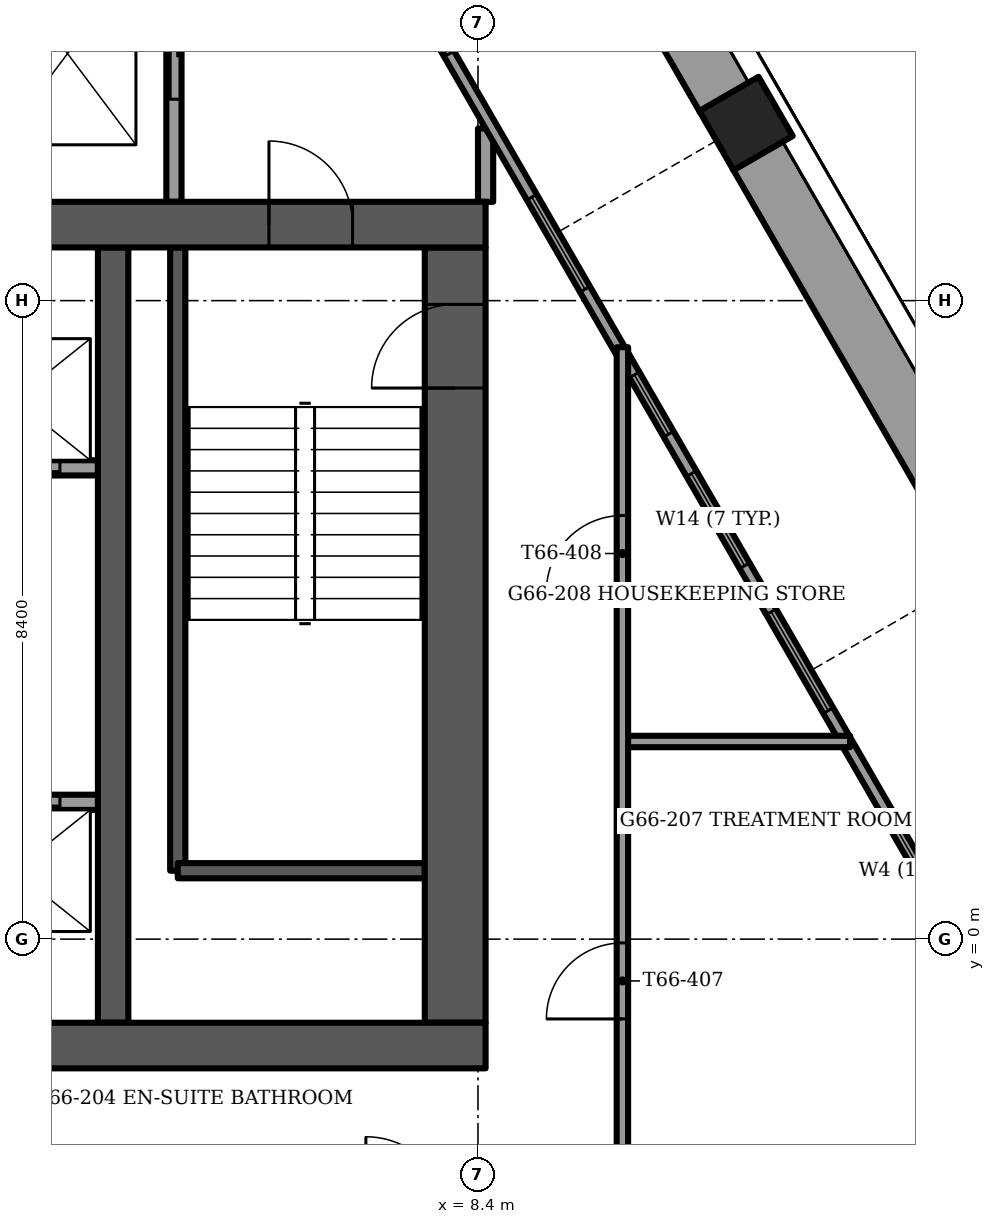
"""IFC4 building model, lengths in metres.
Left out: names, types, materials, properties, quantities, classifications, styles, units other than length and angle.
Written with IfcOpenShell. Run it as: python <this file> out.ifc"""

import sys

from ifc_helpers import new_model, si_unit, direction, frame, frame_2d, origin, origin_2d, place, context, subcontext, project, spatial, rectangle, extrude, element, fill, save


model = new_model("IFC4")
c1 = context("Model", 3, precision=1e-05, world=origin(), true_north=direction((0.0, 1.0)))
c2 = subcontext(c1, "Body", "Model", "MODEL_VIEW")
j1 = project(units=[si_unit("LENGTHUNIT", "METRE"), si_unit("PLANEANGLEUNIT", "RADIAN")], contexts=[c1])
p1 = place(None, origin())
s1 = spatial("IfcSite", under=j1, at=p1, CompositionType="ELEMENT")
p2 = place(p1, origin())
s2 = spatial("IfcBuilding", under=s1, at=p2, CompositionType="ELEMENT")
p3 = place(p2, frame((0.0, 0.0, 267.5)))
s3 = spatial("IfcBuildingStorey", under=s2, at=p3, CompositionType="ELEMENT", Elevation=267.5)
p4 = place(p3, frame((11.926, 10.73, -1.2), z_axis=(0.0, 0.0, 1.0), x_axis=(0.5, -0.866025403784, 0.0)))
e1 = element("IfcColumn", 1, at=p4, inside=s3, PredefinedType="COLUMN", context=c2, shape_type="SweptSolid", body=[
    extrude(rectangle(XDim=0.9, YDim=0.9, at=origin_2d()), origin(), (0.0, 0.0, 1.0), 3.75),
])
p5 = place(p3, frame((-8.5, -1.4, -0.3), z_axis=(0.0, 0.0, 1.0), x_axis=(1.0, 0.0, 0.0)))
e2 = element("IfcWall", 2, at=p5, inside=s3, PredefinedType="SHEAR", context=c2, shape_type="SweptSolid", body=[
    extrude(rectangle(XDim=17.0, YDim=0.6, at=frame_2d((8.5, 0.0))), origin(), (0.0, 0.0, 1.0), 3.75),
])
p6 = place(p5, frame((7.7, 0.0, 0.0)))
e3 = element("IfcOpeningElement", 3, at=p6, cuts=e2, PredefinedType="OPENING", context=c2, shape_type="SweptSolid", body=[
    extrude(rectangle(XDim=1.6, YDim=2.1, at=frame_2d((0.8, 1.05))), frame((0.0, 0.3, 0.0), z_axis=(0.0, -1.0, 0.0), x_axis=(1.0, 0.0, 0.0)), (0.0, 0.0, 1.0), 0.6),
])
p7 = place(p3, frame((-8.5, 9.4, -0.3), z_axis=(0.0, 0.0, 1.0), x_axis=(1.0, 0.0, 0.0)))
e4 = element("IfcWall", 4, at=p7, inside=s3, PredefinedType="SHEAR", context=c2, shape_type="SweptSolid", body=[
    extrude(rectangle(XDim=17.0, YDim=0.6, at=frame_2d((8.5, 0.0))), origin(), (0.0, 0.0, 1.0), 3.75),
])
p8 = place(p7, frame((7.7, 0.0, 0.0)))
e5 = element("IfcOpeningElement", 5, at=p8, cuts=e4, PredefinedType="OPENING", context=c2, shape_type="SweptSolid", body=[
    extrude(rectangle(XDim=1.6, YDim=2.1, at=frame_2d((0.8, 1.05))), frame((0.0, 0.3, 0.0), z_axis=(0.0, -1.0, 0.0), x_axis=(1.0, 0.0, 0.0)), (0.0, 0.0, 1.0), 0.6),
])
p9 = place(p7, frame((1.75, 0.0, 0.0)))
e6 = element("IfcOpeningElement", 6, at=p9, cuts=e4, PredefinedType="OPENING", context=c2, shape_type="SweptSolid", body=[
    extrude(rectangle(XDim=1.1, YDim=2.1, at=frame_2d((0.55, 1.05))), frame((0.0, 0.3, 0.0), z_axis=(0.0, -1.0, 0.0), x_axis=(1.0, 0.0, 0.0)), (0.0, 0.0, 1.0), 0.6),
])
p10 = place(p7, frame((14.15, 0.0, 0.0)))
e7 = element("IfcOpeningElement", 7, at=p10, cuts=e4, PredefinedType="OPENING", context=c2, shape_type="SweptSolid", body=[
    extrude(rectangle(XDim=1.1, YDim=2.1, at=frame_2d((0.55, 1.05))), frame((0.0, 0.3, 0.0), z_axis=(0.0, -1.0, 0.0), x_axis=(1.0, 0.0, 0.0)), (0.0, 0.0, 1.0), 0.6),
])
p11 = place(p3, frame((8.1, -1.1, -0.3), z_axis=(0.0, 0.0, 1.0), x_axis=(0.0, 1.0, 0.0)))
e8 = element("IfcWall", 8, at=p11, inside=s3, PredefinedType="SHEAR", context=c2, shape_type="SweptSolid", body=[
    extrude(rectangle(XDim=10.2, YDim=0.8, at=frame_2d((5.1, 0.0))), origin(), (0.0, 0.0, 1.0), 3.75),
])
p12 = place(p11, frame((8.35, 0.0, 0.0)))
e9 = element("IfcOpeningElement", 9, at=p12, cuts=e8, PredefinedType="OPENING", context=c2, shape_type="SweptSolid", body=[
    extrude(rectangle(XDim=1.1, YDim=2.1, at=frame_2d((0.55, 1.05))), frame((0.0, 0.4, 0.0), z_axis=(0.0, -1.0, 0.0), x_axis=(1.0, 0.0, 0.0)), (0.0, 0.0, 1.0), 0.8),
])
p13 = place(p3, frame((3.6, -1.1, -0.3), z_axis=(0.0, 0.0, 1.0), x_axis=(0.0, 1.0, 0.0)))
e10 = element("IfcWall", 10, at=p13, inside=s3, PredefinedType="SHEAR", context=c2, shape_type="SweptSolid", body=[
    extrude(rectangle(XDim=10.2, YDim=0.4, at=frame_2d((5.1, 0.0))), origin(), (0.0, 0.0, 1.0), 3.75),
])
p14 = place(p3, frame((15.046, 5.327, 0.0), z_axis=(0.0, 0.0, 1.0), x_axis=(-0.499997265274, 0.866026982673, 0.0)))
e11 = element("IfcWall", 11, at=p14, inside=s3, PredefinedType="PARAPET", context=c2, shape_type="SweptSolid", body=[
    extrude(rectangle(XDim=5.819, YDim=0.9, at=frame_2d((2.909, 0.0))), origin(), (0.0, 0.0, 1.0), 1.1),
])
p15 = place(p3, frame((11.716, 11.094, 0.0), z_axis=(0.0, 0.0, 1.0), x_axis=(-0.499984362083, 0.866034432152, 0.0)))
e12 = element("IfcWall", 12, at=p15, inside=s3, PredefinedType="PARAPET", context=c2, shape_type="SweptSolid", body=[
    extrude(rectangle(XDim=6.159, YDim=0.9, at=frame_2d((3.08, 0.0))), origin(), (0.0, 0.0, 1.0), 1.1),
])
p16 = place(p3, frame((9.015, -12.236, 0.0), z_axis=(0.0, 0.0, 1.0), x_axis=(0.499998361514, 0.866026349763, 0.0)))
e13 = element("IfcWall", 13, at=p16, inside=s3, PredefinedType="SOLIDWALL", context=c2, shape_type="SweptSolid", body=[
    extrude(rectangle(XDim=12.179, YDim=0.15, at=frame_2d((6.089, 0.0))), origin(), (0.0, 0.0, 1.0), 3.45),
])
p17 = place(p16, frame((2.189, 0.0, 0.15)))
e14 = element("IfcOpeningElement", 14, at=p17, cuts=e13, PredefinedType="OPENING", context=c2, shape_type="SweptSolid", body=[
    extrude(rectangle(XDim=1.5, YDim=2.85, at=frame_2d((0.75, 1.425))), frame((0.0, 0.075, 0.0), z_axis=(0.0, -1.0, 0.0), x_axis=(1.0, 0.0, 0.0)), (0.0, 0.0, 1.0), 0.15),
])
p18 = place(p16, frame((4.389, 0.0, 0.0)))
e15 = element("IfcOpeningElement", 15, at=p18, cuts=e13, PredefinedType="OPENING", context=c2, shape_type="SweptSolid", body=[
    extrude(rectangle(XDim=1.4, YDim=2.4, at=frame_2d((0.7, 1.2))), frame((0.0, 0.075, 0.0), z_axis=(0.0, -1.0, 0.0), x_axis=(1.0, 0.0, 0.0)), (0.0, 0.0, 1.0), 0.15),
])
p19 = place(p16, frame((6.389, 0.0, 0.15)))
e16 = element("IfcOpeningElement", 16, at=p19, cuts=e13, PredefinedType="OPENING", context=c2, shape_type="SweptSolid", body=[
    extrude(rectangle(XDim=0.9, YDim=2.85, at=frame_2d((0.45, 1.425))), frame((0.0, 0.075, 0.0), z_axis=(0.0, -1.0, 0.0), x_axis=(1.0, 0.0, 0.0)), (0.0, 0.0, 1.0), 0.15),
])
p20 = place(p16, frame((7.583, 0.0, 0.0)))
e17 = element("IfcOpeningElement", 17, at=p20, cuts=e13, PredefinedType="OPENING", context=c2, shape_type="SweptSolid", body=[
    extrude(rectangle(XDim=1.4, YDim=2.4, at=frame_2d((0.7, 1.2))), frame((0.0, 0.075, 0.0), z_axis=(0.0, -1.0, 0.0), x_axis=(1.0, 0.0, 0.0)), (0.0, 0.0, 1.0), 0.15),
])
p21 = place(p16, frame((10.834, 0.0, 0.15)))
e18 = element("IfcOpeningElement", 18, at=p21, cuts=e13, PredefinedType="OPENING", context=c2, shape_type="SweptSolid", body=[
    extrude(rectangle(XDim=0.9, YDim=2.73, at=frame_2d((0.45, 1.365))), frame((0.0, 0.075, 0.0), z_axis=(0.0, -1.0, 0.0), x_axis=(1.0, 0.0, 0.0)), (0.0, 0.0, 1.0), 0.15),
])
p22 = place(p3, frame((15.104, -0.624, 0.0), z_axis=(0.0, 0.0, 1.0), x_axis=(-0.499998195608, 0.866026445548, 0.0)))
e19 = element("IfcWall", 19, at=p22, inside=s3, PredefinedType="SOLIDWALL", context=c2, shape_type="SweptSolid", body=[
    extrude(rectangle(XDim=18.956, YDim=0.15, at=frame_2d((9.478, 0.0))), origin(), (0.0, 0.0, 1.0), 3.45),
])
p23 = place(p22, frame((4.192, 0.0, 0.15)))
e20 = element("IfcOpeningElement", 20, at=p23, cuts=e19, PredefinedType="OPENING", context=c2, shape_type="SweptSolid", body=[
    extrude(rectangle(XDim=1.5, YDim=2.85, at=frame_2d((0.75, 1.425))), frame((0.0, 0.075, 0.0), z_axis=(0.0, -1.0, 0.0), x_axis=(1.0, 0.0, 0.0)), (0.0, 0.0, 1.0), 0.15),
])
p24 = place(p22, frame((6.392, 0.0, 0.15)))
e21 = element("IfcOpeningElement", 21, at=p24, cuts=e19, PredefinedType="OPENING", context=c2, shape_type="SweptSolid", body=[
    extrude(rectangle(XDim=1.4, YDim=2.85, at=frame_2d((0.7, 1.425))), frame((0.0, 0.075, 0.0), z_axis=(0.0, -1.0, 0.0), x_axis=(1.0, 0.0, 0.0)), (0.0, 0.0, 1.0), 0.15),
])
p25 = place(p22, frame((8.392, 0.0, 0.15)))
e22 = element("IfcOpeningElement", 22, at=p25, cuts=e19, PredefinedType="OPENING", context=c2, shape_type="SweptSolid", body=[
    extrude(rectangle(XDim=0.9, YDim=2.85, at=frame_2d((0.45, 1.425))), frame((0.0, 0.075, 0.0), z_axis=(0.0, -1.0, 0.0), x_axis=(1.0, 0.0, 0.0)), (0.0, 0.0, 1.0), 0.15),
])
p26 = place(p22, frame((10.592, 0.0, 0.15)))
e23 = element("IfcOpeningElement", 23, at=p26, cuts=e19, PredefinedType="OPENING", context=c2, shape_type="SweptSolid", body=[
    extrude(rectangle(XDim=1.4, YDim=2.85, at=frame_2d((0.7, 1.425))), frame((0.0, 0.075, 0.0), z_axis=(0.0, -1.0, 0.0), x_axis=(1.0, 0.0, 0.0)), (0.0, 0.0, 1.0), 0.15),
])
p27 = place(p22, frame((14.168, 0.0, 0.0)))
e24 = element("IfcOpeningElement", 24, at=p27, cuts=e19, PredefinedType="OPENING", context=c2, shape_type="SweptSolid", body=[
    extrude(rectangle(XDim=1.4, YDim=2.4, at=frame_2d((0.7, 1.2))), frame((0.0, 0.075, 0.0), z_axis=(0.0, -1.0, 0.0), x_axis=(1.0, 0.0, 0.0)), (0.0, 0.0, 1.0), 0.15),
])
p28 = place(p22, frame((0.998, 0.0, 0.15)))
e25 = element("IfcOpeningElement", 25, at=p28, cuts=e19, PredefinedType="OPENING", context=c2, shape_type="SweptSolid", body=[
    extrude(rectangle(XDim=1.5, YDim=2.73, at=frame_2d((0.75, 1.365))), frame((0.0, 0.075, 0.0), z_axis=(0.0, -1.0, 0.0), x_axis=(1.0, 0.0, 0.0)), (0.0, 0.0, 1.0), 0.15),
])
p29 = place(p22, frame((17.062, 0.0, 0.15)))
e26 = element("IfcOpeningElement", 26, at=p29, cuts=e19, PredefinedType="OPENING", context=c2, shape_type="SweptSolid", body=[
    extrude(rectangle(XDim=1.5, YDim=2.73, at=frame_2d((0.75, 1.365))), frame((0.0, 0.075, 0.0), z_axis=(0.0, -1.0, 0.0), x_axis=(1.0, 0.0, 0.0)), (0.0, 0.0, 1.0), 0.15),
])
p30 = place(p3, frame((1.1, 1.8, 0.0), z_axis=(0.0, 0.0, 1.0), x_axis=(1.0, 0.0, 0.0)))
e27 = element("IfcWall", 27, at=p30, inside=s3, PredefinedType="PARTITIONING", context=c2, shape_type="SweptSolid", body=[
    extrude(rectangle(XDim=2.3, YDim=0.2, at=frame_2d((1.15, 0.0))), origin(), (0.0, 0.0, 1.0), 3.45),
])
p31 = place(p30, frame((0.6, 0.0, 0.0)))
e28 = element("IfcOpeningElement", 28, at=p31, cuts=e27, PredefinedType="OPENING", context=c2, shape_type="SweptSolid", body=[
    extrude(rectangle(XDim=1.2, YDim=2.1, at=frame_2d((0.6, 1.05))), frame((0.0, 0.1, 0.0), z_axis=(0.0, -1.0, 0.0), x_axis=(1.0, 0.0, 0.0)), (0.0, 0.0, 1.0), 0.2),
])
p32 = place(p3, frame((1.1, 6.2, 0.0), z_axis=(0.0, 0.0, 1.0), x_axis=(1.0, 0.0, 0.0)))
e29 = element("IfcWall", 29, at=p32, inside=s3, PredefinedType="PARTITIONING", context=c2, shape_type="SweptSolid", body=[
    extrude(rectangle(XDim=2.3, YDim=0.2, at=frame_2d((1.15, 0.0))), origin(), (0.0, 0.0, 1.0), 3.45),
])
p33 = place(p32, frame((0.6, 0.0, 0.0)))
e30 = element("IfcOpeningElement", 30, at=p33, cuts=e29, PredefinedType="OPENING", context=c2, shape_type="SweptSolid", body=[
    extrude(rectangle(XDim=1.2, YDim=2.1, at=frame_2d((0.6, 1.05))), frame((0.0, 0.1, 0.0), z_axis=(0.0, -1.0, 0.0), x_axis=(1.0, 0.0, 0.0)), (0.0, 0.0, 1.0), 0.2),
])
p34 = place(p3, frame((4.45, 0.9, -0.3), z_axis=(0.0, 0.0, 1.0), x_axis=(0.0, 1.0, 0.0)))
e31 = element("IfcWall", 31, at=p34, inside=s3, PredefinedType="SOLIDWALL", context=c2, shape_type="SweptSolid", body=[
    extrude(rectangle(XDim=8.2, YDim=0.2, at=frame_2d((4.1, 0.0))), origin(), (0.0, 0.0, 1.0), 3.75),
])
p35 = place(p3, frame((4.45, 0.9, -0.3), z_axis=(0.0, 0.0, 1.0), x_axis=(1.0, 0.0, 0.0)))
e32 = element("IfcWall", 32, at=p35, inside=s3, PredefinedType="SOLIDWALL", context=c2, shape_type="SweptSolid", body=[
    extrude(rectangle(XDim=3.25, YDim=0.2, at=frame_2d((1.625, 0.0))), origin(), (0.0, 0.0, 1.0), 3.75),
])
p36 = place(p3, frame((8.5, 9.7, 0.0), z_axis=(0.0, 0.0, 1.0), x_axis=(0.0, 1.0, 0.0)))
e33 = element("IfcWall", 33, at=p36, inside=s3, PredefinedType="PARTITIONING", context=c2, shape_type="SweptSolid", body=[
    extrude(rectangle(XDim=0.965, YDim=0.2, at=frame_2d((0.482, 0.0))), origin(), (0.0, 0.0, 1.0), 3.45),
])
p37 = place(p3, frame((4.4, 9.7, 0.0), z_axis=(0.0, 0.0, 1.0), x_axis=(0.0, 1.0, 0.0)))
e34 = element("IfcWall", 34, at=p37, inside=s3, PredefinedType="PARTITIONING", context=c2, shape_type="SweptSolid", body=[
    extrude(rectangle(XDim=3.9, YDim=0.2, at=frame_2d((1.95, 0.0))), origin(), (0.0, 0.0, 1.0), 3.45),
])
p38 = place(p37, frame((1.35, 0.0, 0.0)))
e35 = element("IfcOpeningElement", 35, at=p38, cuts=e34, PredefinedType="OPENING", context=c2, shape_type="SweptSolid", body=[
    extrude(rectangle(XDim=1.2, YDim=2.1, at=frame_2d((0.6, 1.05))), frame((0.0, 0.1, 0.0), z_axis=(0.0, -1.0, 0.0), x_axis=(1.0, 0.0, 0.0)), (0.0, 0.0, 1.0), 0.2),
])
p39 = place(p3, frame((10.3, 2.6, 0.0), z_axis=(0.0, 0.0, 1.0), x_axis=(1.0, 0.0, 0.0)))
e36 = element("IfcWall", 36, at=p39, inside=s3, PredefinedType="PARTITIONING", context=c2, shape_type="SweptSolid", body=[
    extrude(rectangle(XDim=2.995, YDim=0.15, at=frame_2d((1.498, 0.0))), origin(), (0.0, 0.0, 1.0), 3.45),
])
p40 = place(p3, frame((10.3, -3.7, 0.0), z_axis=(0.0, 0.0, 1.0), x_axis=(0.0, 1.0, 0.0)))
e37 = element("IfcWall", 37, at=p40, inside=s3, PredefinedType="PARTITIONING", context=c2, shape_type="SweptSolid", body=[
    extrude(rectangle(XDim=11.487, YDim=0.15, at=frame_2d((5.744, 0.0))), origin(), (0.0, 0.0, 1.0), 3.45),
])
p41 = place(p40, frame((2.65, 0.0, 0.0)))
e38 = element("IfcOpeningElement", 38, at=p41, cuts=e37, PredefinedType="OPENING", context=c2, shape_type="SweptSolid", body=[
    extrude(rectangle(XDim=1.0, YDim=2.1, at=frame_2d((0.5, 1.05))), frame((0.0, 0.075, 0.0), z_axis=(0.0, -1.0, 0.0), x_axis=(1.0, 0.0, 0.0)), (0.0, 0.0, 1.0), 0.15),
])
p42 = place(p40, frame((8.273, 0.0, 0.0)))
e39 = element("IfcOpeningElement", 39, at=p42, cuts=e37, PredefinedType="OPENING", context=c2, shape_type="SweptSolid", body=[
    extrude(rectangle(XDim=1.0, YDim=2.1, at=frame_2d((0.5, 1.05))), frame((0.0, 0.075, 0.0), z_axis=(0.0, -1.0, 0.0), x_axis=(1.0, 0.0, 0.0)), (0.0, 0.0, 1.0), 0.15),
])
p43 = place(p23, origin())
e40 = element("IfcWindow", 40, at=p43, inside=s3, PartitioningType="SINGLE_PANEL", PredefinedType="WINDOW", context=c2, shape_type="SweptSolid", body=[
    extrude(rectangle(XDim=1.5, YDim=2.85, at=frame_2d((0.75, 1.425))), frame((0.0, 0.03, 0.0), z_axis=(0.0, -1.0, 0.0), x_axis=(1.0, 0.0, 0.0)), (0.0, 0.0, 1.0), 0.06),
])
fill(e20, e40)
p44 = place(p24, origin())
e41 = element("IfcWindow", 41, at=p44, inside=s3, PartitioningType="SINGLE_PANEL", PredefinedType="WINDOW", context=c2, shape_type="SweptSolid", body=[
    extrude(rectangle(XDim=1.4, YDim=2.85, at=frame_2d((0.7, 1.425))), frame((0.0, 0.03, 0.0), z_axis=(0.0, -1.0, 0.0), x_axis=(1.0, 0.0, 0.0)), (0.0, 0.0, 1.0), 0.06),
])
fill(e21, e41)
p45 = place(p25, origin())
e42 = element("IfcWindow", 42, at=p45, inside=s3, PartitioningType="SINGLE_PANEL", PredefinedType="WINDOW", context=c2, shape_type="SweptSolid", body=[
    extrude(rectangle(XDim=0.9, YDim=2.85, at=frame_2d((0.45, 1.425))), frame((0.0, 0.03, 0.0), z_axis=(0.0, -1.0, 0.0), x_axis=(1.0, 0.0, 0.0)), (0.0, 0.0, 1.0), 0.06),
])
fill(e22, e42)
p46 = place(p26, origin())
e43 = element("IfcWindow", 43, at=p46, inside=s3, PartitioningType="SINGLE_PANEL", PredefinedType="WINDOW", context=c2, shape_type="SweptSolid", body=[
    extrude(rectangle(XDim=1.4, YDim=2.85, at=frame_2d((0.7, 1.425))), frame((0.0, 0.03, 0.0), z_axis=(0.0, -1.0, 0.0), x_axis=(1.0, 0.0, 0.0)), (0.0, 0.0, 1.0), 0.06),
])
fill(e23, e43)
p47 = place(p27, origin())
e44 = element("IfcDoor", 44, at=p47, inside=s3, OperationType="SLIDING_TO_RIGHT", PredefinedType="DOOR", context=c2, shape_type="SweptSolid", body=[
    extrude(rectangle(XDim=1.4, YDim=2.4, at=frame_2d((0.7, 1.2))), frame((0.0, 0.025, 0.0), z_axis=(0.0, -1.0, 0.0), x_axis=(1.0, 0.0, 0.0)), (0.0, 0.0, 1.0), 0.05),
])
fill(e24, e44)
p48 = place(p28, origin())
e45 = element("IfcWindow", 45, at=p48, inside=s3, PartitioningType="SINGLE_PANEL", PredefinedType="WINDOW", context=c2, shape_type="SweptSolid", body=[
    extrude(rectangle(XDim=1.5, YDim=2.73, at=frame_2d((0.75, 1.365))), frame((0.0, 0.03, 0.0), z_axis=(0.0, -1.0, 0.0), x_axis=(1.0, 0.0, 0.0)), (0.0, 0.0, 1.0), 0.06),
])
fill(e25, e45)
p49 = place(p31, origin())
e46 = element("IfcDoor", 46, at=p49, inside=s3, OperationType="SLIDING_TO_LEFT", PredefinedType="DOOR", context=c2, shape_type="SweptSolid", body=[
    extrude(rectangle(XDim=1.2, YDim=2.1, at=frame_2d((0.6, 1.05))), frame((0.0, 0.025, 0.0), z_axis=(0.0, -1.0, 0.0), x_axis=(1.0, 0.0, 0.0)), (0.0, 0.0, 1.0), 0.05),
])
fill(e28, e46)
p50 = place(p33, origin())
e47 = element("IfcDoor", 47, at=p50, inside=s3, OperationType="SLIDING_TO_LEFT", PredefinedType="DOOR", context=c2, shape_type="SweptSolid", body=[
    extrude(rectangle(XDim=1.2, YDim=2.1, at=frame_2d((0.6, 1.05))), frame((0.0, 0.025, 0.0), z_axis=(0.0, -1.0, 0.0), x_axis=(1.0, 0.0, 0.0)), (0.0, 0.0, 1.0), 0.05),
])
fill(e30, e47)
p51 = place(p10, origin())
e48 = element("IfcDoor", 48, at=p51, inside=s3, OperationType="SINGLE_SWING_RIGHT", PredefinedType="DOOR", context=c2, shape_type="SweptSolid", body=[
    extrude(rectangle(XDim=1.1, YDim=2.1, at=frame_2d((0.55, 1.05))), frame((0.0, 0.025, 0.0), z_axis=(0.0, -1.0, 0.0), x_axis=(1.0, 0.0, 0.0)), (0.0, 0.0, 1.0), 0.05),
])
fill(e7, e48)
p52 = place(p12, origin())
e49 = element("IfcDoor", 49, at=p52, inside=s3, OperationType="SINGLE_SWING_LEFT", PredefinedType="DOOR", context=c2, shape_type="SweptSolid", body=[
    extrude(rectangle(XDim=1.1, YDim=2.1, at=frame_2d((0.55, 1.05))), frame((0.0, 0.025, 0.0), z_axis=(0.0, -1.0, 0.0), x_axis=(1.0, 0.0, 0.0)), (0.0, 0.0, 1.0), 0.05),
])
fill(e9, e49)
p53 = place(p38, origin())
e50 = element("IfcDoor", 50, at=p53, inside=s3, OperationType="SLIDING_TO_LEFT", PredefinedType="DOOR", context=c2, shape_type="SweptSolid", body=[
    extrude(rectangle(XDim=1.2, YDim=2.1, at=frame_2d((0.6, 1.05))), frame((0.0, 0.025, 0.0), z_axis=(0.0, -1.0, 0.0), x_axis=(1.0, 0.0, 0.0)), (0.0, 0.0, 1.0), 0.05),
])
fill(e35, e50)
p54 = place(p41, origin())
e51 = element("IfcDoor", 51, at=p54, inside=s3, OperationType="SINGLE_SWING_LEFT", PredefinedType="DOOR", context=c2, shape_type="SweptSolid", body=[
    extrude(rectangle(XDim=1.0, YDim=2.1, at=frame_2d((0.5, 1.05))), frame((0.0, 0.025, 0.0), z_axis=(0.0, -1.0, 0.0), x_axis=(1.0, 0.0, 0.0)), (0.0, 0.0, 1.0), 0.05),
])
fill(e38, e51)
p55 = place(p42, origin())
e52 = element("IfcDoor", 52, at=p55, inside=s3, OperationType="SINGLE_SWING_LEFT", PredefinedType="DOOR", context=c2, shape_type="SweptSolid", body=[
    extrude(rectangle(XDim=1.0, YDim=2.1, at=frame_2d((0.5, 1.05))), frame((0.0, 0.025, 0.0), z_axis=(0.0, -1.0, 0.0), x_axis=(1.0, 0.0, 0.0)), (0.0, 0.0, 1.0), 0.05),
])
fill(e39, e52)
save(model, sys.argv[1])
